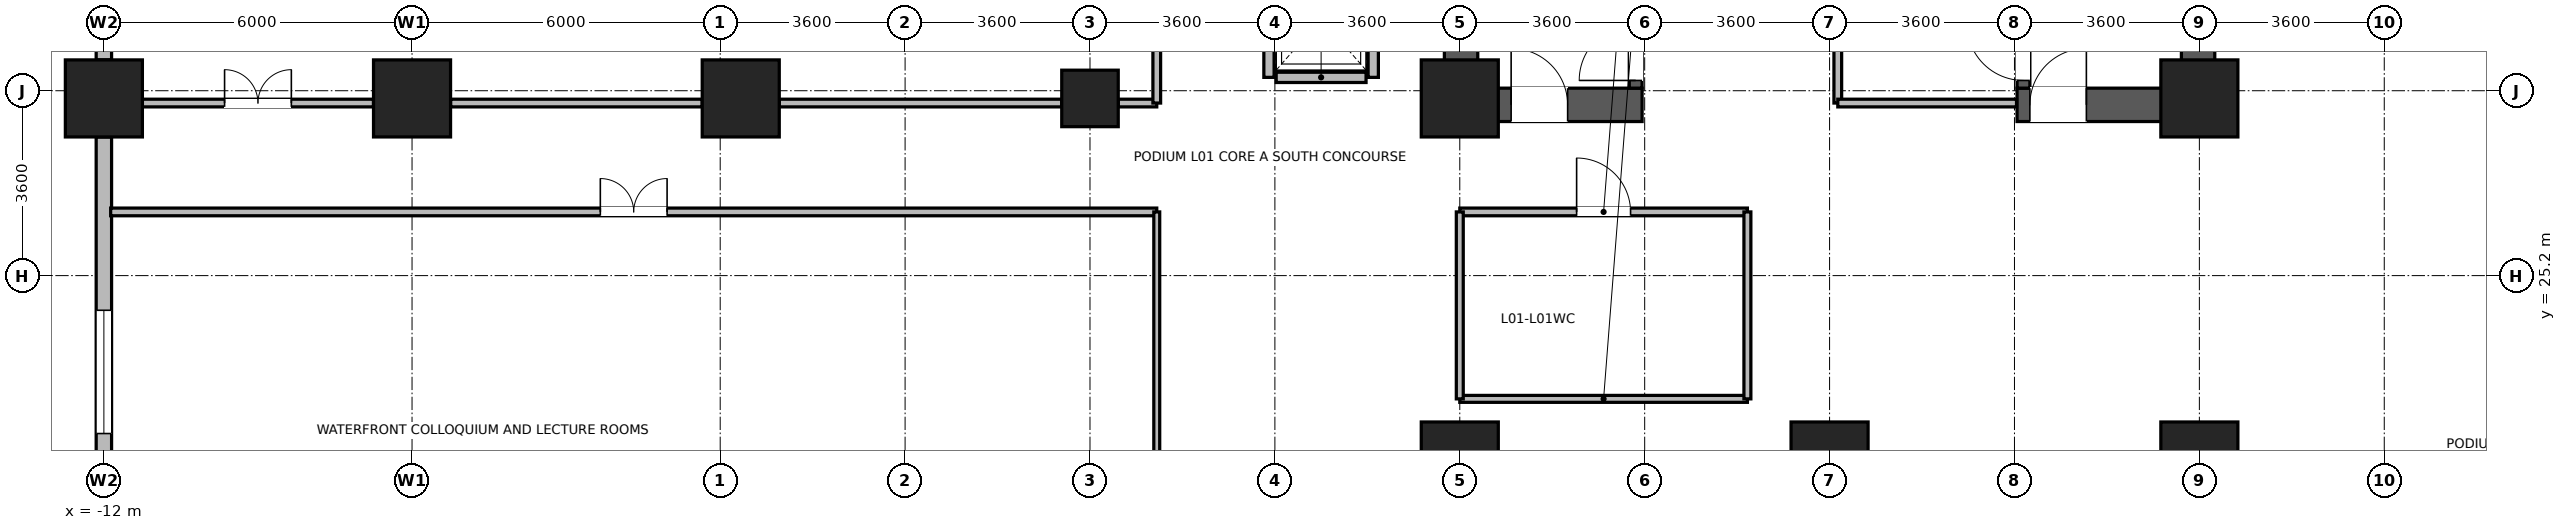
"""IFC4 building model, lengths in metres.
Left out: names, types, materials, properties, quantities, classifications, styles, units other than length and angle.
Written with IfcOpenShell. Run it as: python <this file> out.ifc"""

import sys

from ifc_helpers import new_model, si_unit, direction, frame, frame_2d, origin, origin_2d, place, context, subcontext, project, spatial, rectangle, circle, extrude, source, transform, mapped, element, fill, save


model = new_model("IFC4")
c1 = context("Model", 3, precision=1e-05, world=origin(), true_north=direction((0.0, 1.0)))
c2 = subcontext(c1, "Body", "Model", "MODEL_VIEW")
j1 = project(units=[si_unit("LENGTHUNIT", "METRE"), si_unit("PLANEANGLEUNIT", "RADIAN")], contexts=[c1])
p1 = place(None, origin())
s1 = spatial("IfcSite", under=j1, at=p1, CompositionType="ELEMENT")
p2 = place(p1, origin())
s2 = spatial("IfcBuilding", under=s1, at=p2, CompositionType="ELEMENT")
p3 = place(p2, frame((0.0, 0.0, 5.4)))
s3 = spatial("IfcBuildingStorey", under=s2, at=p3, CompositionType="ELEMENT", Elevation=5.4)
for number, where, z_axis, x_axis in (
    (1, (14.425, 28.2, 0.0), (0.0, 0.0, 1.0), (0.0, 1.0, 0.0)),
    (2, (28.775, 28.2, 0.0), (0.0, 0.0, 1.0), (0.0, 1.0, 0.0)),
):
    element("IfcWall", number, at=place(p3, frame(where, z_axis=z_axis, x_axis=x_axis)), inside=s3, PredefinedType="SHEAR", context=c2, shape_type="SweptSolid", body=[
        extrude(rectangle(XDim=8.3, YDim=0.65, at=frame_2d((4.15, 0.0))), origin(), (0.0, 0.0, 1.0), 4.52),
    ])
p4 = place(p3, frame((14.75, 28.525, 0.0), z_axis=(0.0, 0.0, 1.0), x_axis=(1.0, 0.0, 0.0)))
e3 = element("IfcWall", 3, at=p4, inside=s3, PredefinedType="SHEAR", context=c2, shape_type="SweptSolid", body=[
    extrude(rectangle(XDim=3.2, YDim=0.65, at=frame_2d((1.6, 0.0))), origin(), (0.0, 0.0, 1.0), 4.52),
])
p5 = place(p4, frame((0.65, 0.0, 0.0)))
e4 = element("IfcOpeningElement", 4, at=p5, cuts=e3, PredefinedType="OPENING", context=c2, shape_type="SweptSolid", body=[
    extrude(rectangle(XDim=1.1, YDim=2.08, at=frame_2d((0.55, 1.04))), frame((0.0, 0.335, 0.0), z_axis=(0.0, -1.0, 0.0), x_axis=(1.0, 0.0, 0.0)), (0.0, 0.0, 1.0), 0.67),
])
p6 = place(p3, frame((25.25, 28.525, 0.0), z_axis=(0.0, 0.0, 1.0), x_axis=(1.0, 0.0, 0.0)))
e5 = element("IfcWall", 5, at=p6, inside=s3, PredefinedType="SHEAR", context=c2, shape_type="SweptSolid", body=[
    extrude(rectangle(XDim=3.2, YDim=0.65, at=frame_2d((1.6, 0.0))), origin(), (0.0, 0.0, 1.0), 4.52),
])
p7 = place(p6, frame((0.25, 0.0, 0.0)))
e6 = element("IfcOpeningElement", 6, at=p7, cuts=e5, PredefinedType="OPENING", context=c2, shape_type="SweptSolid", body=[
    extrude(rectangle(XDim=1.1, YDim=2.08, at=frame_2d((0.55, 1.04))), frame((0.0, 0.335, 0.0), z_axis=(0.0, -1.0, 0.0), x_axis=(1.0, 0.0, 0.0)), (0.0, 0.0, 1.0), 0.67),
])
p8 = place(p3, frame((17.825, 28.85, 0.0), z_axis=(0.0, 0.0, 1.0), x_axis=(0.0, 1.0, 0.0)))
e7 = element("IfcWall", 7, at=p8, inside=s3, PredefinedType="SHEAR", context=c2, shape_type="SweptSolid", body=[
    extrude(rectangle(XDim=7.0, YDim=0.25, at=frame_2d((3.5, 0.0))), origin(), (0.0, 0.0, 1.0), 4.52),
])
p9 = place(p8, frame((0.15, 0.0, 0.0)))
e8 = element("IfcOpeningElement", 8, at=p9, cuts=e7, PredefinedType="OPENING", context=c2, shape_type="SweptSolid", body=[
    extrude(rectangle(XDim=1.1, YDim=2.08, at=frame_2d((0.55, 1.04))), frame((0.0, 0.135, 0.0), z_axis=(0.0, -1.0, 0.0), x_axis=(1.0, 0.0, 0.0)), (0.0, 0.0, 1.0), 0.27),
])
p10 = place(p3, frame((25.375, 28.85, 0.0), z_axis=(0.0, 0.0, 1.0), x_axis=(0.0, 1.0, 0.0)))
e9 = element("IfcWall", 9, at=p10, inside=s3, PredefinedType="SHEAR", context=c2, shape_type="SweptSolid", body=[
    extrude(rectangle(XDim=7.0, YDim=0.25, at=frame_2d((3.5, 0.0))), origin(), (0.0, 0.0, 1.0), 4.52),
])
p11 = place(p10, frame((0.15, 0.0, 0.0)))
e10 = element("IfcOpeningElement", 10, at=p11, cuts=e9, PredefinedType="OPENING", context=c2, shape_type="SweptSolid", body=[
    extrude(rectangle(XDim=1.1, YDim=2.08, at=frame_2d((0.55, 1.04))), frame((0.0, 0.135, 0.0), z_axis=(0.0, -1.0, 0.0), x_axis=(1.0, 0.0, 0.0)), (0.0, 0.0, 1.0), 0.27),
])
m1 = source(origin(), c2, "Body", "SweptSolid", [
    extrude(circle(Radius=0.55, at=origin_2d()), origin(), (0.0, 0.0, 1.0), 4.8),
])
p12 = place(p3, frame((7.2, 28.65, 0.0), z_axis=(0.0, 0.0, 1.0), x_axis=(1.0, 0.0, 0.0)))
e11 = element("IfcColumn", 11, at=p12, inside=s3, PredefinedType="COLUMN", context=c2, shape_type="MappedRepresentation", body=[
    mapped(m1, transform((0.0, 0.0, 0.0), x_axis=(1.0, 0.0, 0.0), y_axis=(0.0, 1.0, 0.0), z_axis=(0.0, 0.0, 1.0), scale=1.0)),
])
m2 = source(origin(), c2, "Body", "SweptSolid", [
    extrude(rectangle(XDim=1.5, YDim=1.5, at=origin_2d()), origin(), (0.0, 0.0, 1.0), 4.8),
])
for number, where, z_axis, x_axis in (
    (12, (14.4, 21.6, 0.0), (0.0, 0.0, 1.0), (1.0, 0.0, 0.0)),
    (13, (14.4, 28.65, 0.0), (0.0, 0.0, 1.0), (1.0, 0.0, 0.0)),
    (14, (21.6, 21.6, 0.0), (0.0, 0.0, 1.0), (1.0, 0.0, 0.0)),
    (15, (28.8, 21.6, 0.0), (0.0, 0.0, 1.0), (1.0, 0.0, 0.0)),
    (16, (28.8, 28.65, 0.0), (0.0, 0.0, 1.0), (1.0, 0.0, 0.0)),
    (17, (0.4, 28.65, 0.0), (0.0, 0.0, 1.0), (1.0, 0.0, 0.0)),
    (18, (-12.0, 28.65, 0.0), (0.0, 0.0, 1.0), (1.0, 0.0, 0.0)),
    (19, (-6.0, 28.65, 0.0), (0.0, 0.0, 1.0), (1.0, 0.0, 0.0)),
):
    element("IfcColumn", number, at=place(p3, frame(where, z_axis=z_axis, x_axis=x_axis)), inside=s3, PredefinedType="COLUMN", context=c2, shape_type="MappedRepresentation", body=[
        mapped(m2, transform((0.0, 0.0, 0.0), x_axis=(1.0, 0.0, 0.0), y_axis=(0.0, 1.0, 0.0), z_axis=(0.0, 0.0, 1.0), scale=1.0)),
    ])
p13 = place(p3, frame((-12.0, 29.401, 0.0), z_axis=(0.0, 0.0, 1.0), x_axis=(0.0, 1.0, 0.0)))
e20 = element("IfcWall", 20, at=p13, inside=s3, PredefinedType="STANDARD", context=c2, shape_type="SweptSolid", body=[
    extrude(rectangle(XDim=5.998, YDim=0.3, at=frame_2d((2.999, 0.0))), origin(), (0.0, 0.0, 1.0), 3.9),
])
p14 = place(p13, frame((2.524, 0.0, 0.9)))
e21 = element("IfcOpeningElement", 21, at=p14, cuts=e20, PredefinedType="OPENING", context=c2, shape_type="SweptSolid", body=[
    extrude(rectangle(XDim=0.95, YDim=1.75, at=frame_2d((0.475, 0.875))), frame((0.0, 0.16, 0.0), z_axis=(0.0, -1.0, 0.0), x_axis=(1.0, 0.0, 0.0)), (0.0, 0.0, 1.0), 0.32),
])
p15 = place(p13, frame((1.037, 0.0, 0.9)))
e22 = element("IfcOpeningElement", 22, at=p15, cuts=e20, PredefinedType="OPENING", context=c2, shape_type="SweptSolid", body=[
    extrude(rectangle(XDim=0.95, YDim=1.75, at=frame_2d((0.475, 0.875))), frame((0.0, 0.16, 0.0), z_axis=(0.0, -1.0, 0.0), x_axis=(1.0, 0.0, 0.0)), (0.0, 0.0, 1.0), 0.32),
])
p16 = place(p3, frame((-12.0, 18.751, 0.0), z_axis=(0.0, 0.0, 1.0), x_axis=(0.0, 1.0, 0.0)))
e23 = element("IfcWall", 23, at=p16, inside=s3, PredefinedType="STANDARD", context=c2, shape_type="SweptSolid", body=[
    extrude(rectangle(XDim=9.148, YDim=0.3, at=frame_2d((4.574, 0.0))), origin(), (0.0, 0.0, 1.0), 3.9),
])
p17 = place(p16, frame((0.325, 0.0, 0.9)))
e24 = element("IfcOpeningElement", 24, at=p17, cuts=e23, PredefinedType="OPENING", context=c2, shape_type="SweptSolid", body=[
    extrude(rectangle(XDim=2.4, YDim=2.5, at=frame_2d((1.2, 1.25))), frame((0.0, 0.16, 0.0), z_axis=(0.0, -1.0, 0.0), x_axis=(1.0, 0.0, 0.0)), (0.0, 0.0, 1.0), 0.32),
])
p18 = place(p16, frame((3.374, 0.0, 0.9)))
e25 = element("IfcOpeningElement", 25, at=p18, cuts=e23, PredefinedType="OPENING", context=c2, shape_type="SweptSolid", body=[
    extrude(rectangle(XDim=2.4, YDim=2.5, at=frame_2d((1.2, 1.25))), frame((0.0, 0.16, 0.0), z_axis=(0.0, -1.0, 0.0), x_axis=(1.0, 0.0, 0.0)), (0.0, 0.0, 1.0), 0.32),
])
p19 = place(p3, frame((10.825, 29.06, 0.0), z_axis=(0.0, 0.0, 1.0), x_axis=(1.0, 0.0, 0.0)))
e26 = element("IfcWall", 26, at=p19, inside=s3, PredefinedType="PARTITIONING", context=c2, shape_type="SweptSolid", body=[
    extrude(rectangle(XDim=1.75, YDim=0.2, at=frame_2d((0.875, 0.0))), origin(), (0.0, 0.0, 1.0), 4.5),
])
for number, where, z_axis, x_axis in (
    (27, (10.685, 29.06, 0.0), (0.0, 0.0, 1.0), (0.0, 1.0, 0.0)),
    (28, (12.715, 29.06, 0.0), (0.0, 0.0, 1.0), (0.0, 1.0, 0.0)),
):
    element("IfcWall", number, at=place(p3, frame(where, z_axis=z_axis, x_axis=x_axis)), inside=s3, PredefinedType="PARTITIONING", context=c2, shape_type="SweptSolid", body=[
        extrude(rectangle(XDim=2.28, YDim=0.2, at=frame_2d((1.14, 0.0))), origin(), (0.0, 0.0, 1.0), 4.5),
    ])
p20 = place(p3, frame((-11.868, 26.44, 0.0), z_axis=(0.0, 0.0, 1.0), x_axis=(1.0, 0.0, 0.0)))
e29 = element("IfcWall", 29, at=p20, inside=s3, PredefinedType="PARTITIONING", context=c2, shape_type="SweptSolid", body=[
    extrude(rectangle(XDim=20.368, YDim=0.15, at=frame_2d((10.184, 0.0))), origin(), (0.0, 0.0, 1.0), 4.5),
])
p21 = place(p20, frame((9.534, 0.0, 0.0)))
e30 = element("IfcOpeningElement", 30, at=p21, cuts=e29, PredefinedType="OPENING", context=c2, shape_type="SweptSolid", body=[
    extrude(rectangle(XDim=1.3, YDim=2.12, at=frame_2d((0.65, 1.06))), frame((0.0, 0.085, 0.0), z_axis=(0.0, -1.0, 0.0), x_axis=(1.0, 0.0, 0.0)), (0.0, 0.0, 1.0), 0.17),
])
p22 = place(p3, frame((-11.25, 28.56, 0.0), z_axis=(0.0, 0.0, 1.0), x_axis=(1.0, 0.0, 0.0)))
e31 = element("IfcWall", 31, at=p22, inside=s3, PredefinedType="PARTITIONING", context=c2, shape_type="SweptSolid", body=[
    extrude(rectangle(XDim=4.5, YDim=0.15, at=frame_2d((2.25, 0.0))), origin(), (0.0, 0.0, 1.0), 3.8),
])
p23 = place(p22, frame((1.6, 0.0, 0.0)))
e32 = element("IfcOpeningElement", 32, at=p23, cuts=e31, PredefinedType="OPENING", context=c2, shape_type="SweptSolid", body=[
    extrude(rectangle(XDim=1.3, YDim=2.12, at=frame_2d((0.65, 1.06))), frame((0.0, 0.085, 0.0), z_axis=(0.0, -1.0, 0.0), x_axis=(1.0, 0.0, 0.0)), (0.0, 0.0, 1.0), 0.17),
])
p24 = place(p3, frame((-5.25, 28.56, 0.0), z_axis=(0.0, 0.0, 1.0), x_axis=(1.0, 0.0, 0.0)))
e33 = element("IfcWall", 33, at=p24, inside=s3, PredefinedType="PARTITIONING", context=c2, shape_type="SweptSolid", body=[
    extrude(rectangle(XDim=4.9, YDim=0.15, at=frame_2d((2.45, 0.0))), origin(), (0.0, 0.0, 1.0), 3.8),
])
p25 = place(p3, frame((1.15, 28.56, 0.0), z_axis=(0.0, 0.0, 1.0), x_axis=(1.0, 0.0, 0.0)))
e34 = element("IfcWall", 34, at=p25, inside=s3, PredefinedType="PARTITIONING", context=c2, shape_type="SweptSolid", body=[
    extrude(rectangle(XDim=5.5, YDim=0.15, at=frame_2d((2.75, 0.0))), origin(), (0.0, 0.0, 1.0), 3.8),
])
p26 = place(p3, frame((7.75, 28.56, 0.0), z_axis=(0.0, 0.0, 1.0), x_axis=(1.0, 0.0, 0.0)))
e35 = element("IfcWall", 35, at=p26, inside=s3, PredefinedType="PARTITIONING", context=c2, shape_type="SweptSolid", body=[
    extrude(rectangle(XDim=0.75, YDim=0.15, at=frame_2d((0.375, 0.0))), origin(), (0.0, 0.0, 1.0), 3.8),
])
p27 = place(p3, frame((8.5, 28.56, 0.0), z_axis=(0.0, 0.0, 1.0), x_axis=(0.0, 1.0, 0.0)))
e36 = element("IfcWall", 36, at=p27, inside=s3, PredefinedType="PARTITIONING", context=c2, shape_type="SweptSolid", body=[
    extrude(rectangle(XDim=7.68, YDim=0.15, at=frame_2d((3.84, 0.0))), origin(), (0.0, 0.0, 1.0), 4.5),
])
p28 = place(p3, frame((14.4, 26.44, 0.0), z_axis=(0.0, 0.0, 1.0), x_axis=(1.0, 0.0, 0.0)))
e37 = element("IfcWall", 37, at=p28, inside=s3, PredefinedType="PARTITIONING", context=c2, shape_type="SweptSolid", body=[
    extrude(rectangle(XDim=5.6, YDim=0.15, at=frame_2d((2.8, 0.0))), origin(), (0.0, 0.0, 1.0), 4.5),
])
p29 = place(p28, frame((2.275, 0.0, 0.0)))
e38 = element("IfcOpeningElement", 38, at=p29, cuts=e37, PredefinedType="OPENING", context=c2, shape_type="SweptSolid", body=[
    extrude(rectangle(XDim=1.05, YDim=2.12, at=frame_2d((0.525, 1.06))), frame((0.0, 0.085, 0.0), z_axis=(0.0, -1.0, 0.0), x_axis=(1.0, 0.0, 0.0)), (0.0, 0.0, 1.0), 0.17),
])
p30 = place(p3, frame((8.5, 18.132, 0.0), z_axis=(0.0, 0.0, 1.0), x_axis=(0.0, 1.0, 0.0)))
e39 = element("IfcWall", 39, at=p30, inside=s3, PredefinedType="PARTITIONING", context=c2, shape_type="SweptSolid", body=[
    extrude(rectangle(XDim=8.308, YDim=0.115, at=frame_2d((4.154, 0.0))), origin(), (0.0, 0.0, 1.0), 4.5),
])
p31 = place(p3, frame((14.4, 22.8, 0.0), z_axis=(0.0, 0.0, 1.0), x_axis=(1.0, 0.0, 0.0)))
e40 = element("IfcWall", 40, at=p31, inside=s3, PredefinedType="PARTITIONING", context=c2, shape_type="SweptSolid", body=[
    extrude(rectangle(XDim=5.6, YDim=0.135, at=frame_2d((2.8, 0.0))), origin(), (0.0, 0.0, 1.0), 4.5),
])
p32 = place(p3, frame((21.76, 28.56, 0.0), z_axis=(0.0, 0.0, 1.0), x_axis=(0.0, 1.0, 0.0)))
e41 = element("IfcWall", 41, at=p32, inside=s3, PredefinedType="PARTITIONING", context=c2, shape_type="SweptSolid", body=[
    extrude(rectangle(XDim=4.6, YDim=0.15, at=frame_2d((2.3, 0.0))), origin(), (0.0, 0.0, 1.0), 4.5),
])
p33 = place(p32, frame((1.55, 0.0, 0.0)))
e42 = element("IfcOpeningElement", 42, at=p33, cuts=e41, PredefinedType="OPENING", context=c2, shape_type="SweptSolid", body=[
    extrude(rectangle(XDim=1.5, YDim=2.1, at=frame_2d((0.75, 1.05))), frame((0.0, 0.085, 0.0), z_axis=(0.0, -1.0, 0.0), x_axis=(1.0, 0.0, 0.0)), (0.0, 0.0, 1.0), 0.17),
])
p34 = place(p3, frame((14.4, 22.8, 0.0), z_axis=(0.0, 0.0, 1.0), x_axis=(0.0, 1.0, 0.0)))
e43 = element("IfcWall", 43, at=p34, inside=s3, PredefinedType="PARTITIONING", context=c2, shape_type="SweptSolid", body=[
    extrude(rectangle(XDim=3.64, YDim=0.135, at=frame_2d((1.82, 0.0))), origin(), (0.0, 0.0, 1.0), 3.9),
])
p35 = place(p3, frame((20.0, 22.8, 0.0), z_axis=(0.0, 0.0, 1.0), x_axis=(0.0, 1.0, 0.0)))
e44 = element("IfcWall", 44, at=p35, inside=s3, PredefinedType="PARTITIONING", context=c2, shape_type="SweptSolid", body=[
    extrude(rectangle(XDim=3.64, YDim=0.135, at=frame_2d((1.82, 0.0))), origin(), (0.0, 0.0, 1.0), 4.5),
])
p36 = place(p3, frame((21.76, 28.56, 0.0), z_axis=(0.0, 0.0, 1.0), x_axis=(1.0, 0.0, 0.0)))
e45 = element("IfcWall", 45, at=p36, inside=s3, PredefinedType="PARTITIONING", context=c2, shape_type="SweptSolid", body=[
    extrude(rectangle(XDim=3.48, YDim=0.15, at=frame_2d((1.74, 0.0))), origin(), (0.0, 0.0, 1.0), 3.3),
])
p37 = place(p18, origin())
e46 = element("IfcWindow", 46, at=p37, inside=s3, PartitioningType="SINGLE_PANEL", PredefinedType="WINDOW", context=c2, shape_type="SweptSolid", body=[
    extrude(rectangle(XDim=2.4, YDim=2.5, at=frame_2d((1.2, 1.25))), frame((0.0, 0.03, 0.0), z_axis=(0.0, -1.0, 0.0), x_axis=(1.0, 0.0, 0.0)), (0.0, 0.0, 1.0), 0.06),
])
fill(e25, e46)
p38 = place(p9, origin())
e47 = element("IfcDoor", 47, at=p38, inside=s3, OperationType="SINGLE_SWING_LEFT", PredefinedType="DOOR", context=c2, shape_type="SweptSolid", body=[
    extrude(rectangle(XDim=1.1, YDim=2.08, at=frame_2d((0.55, 1.04))), frame((0.0, 0.025, 0.0), z_axis=(0.0, -1.0, 0.0), x_axis=(1.0, 0.0, 0.0)), (0.0, 0.0, 1.0), 0.05),
])
fill(e8, e47)
p39 = place(p5, origin())
e48 = element("IfcDoor", 48, at=p39, inside=s3, OperationType="SINGLE_SWING_LEFT", PredefinedType="DOOR", context=c2, shape_type="SweptSolid", body=[
    extrude(rectangle(XDim=1.1, YDim=2.08, at=frame_2d((0.55, 1.04))), frame((0.0, 0.025, 0.0), z_axis=(0.0, -1.0, 0.0), x_axis=(1.0, 0.0, 0.0)), (0.0, 0.0, 1.0), 0.05),
])
fill(e4, e48)
p40 = place(p11, origin())
e49 = element("IfcDoor", 49, at=p40, inside=s3, OperationType="SINGLE_SWING_RIGHT", PredefinedType="DOOR", context=c2, shape_type="SweptSolid", body=[
    extrude(rectangle(XDim=1.1, YDim=2.08, at=frame_2d((0.55, 1.04))), frame((0.0, 0.025, 0.0), z_axis=(0.0, -1.0, 0.0), x_axis=(1.0, 0.0, 0.0)), (0.0, 0.0, 1.0), 0.05),
])
fill(e10, e49)
p41 = place(p7, origin())
e50 = element("IfcDoor", 50, at=p41, inside=s3, OperationType="SINGLE_SWING_RIGHT", PredefinedType="DOOR", context=c2, shape_type="SweptSolid", body=[
    extrude(rectangle(XDim=1.1, YDim=2.08, at=frame_2d((0.55, 1.04))), frame((0.0, 0.025, 0.0), z_axis=(0.0, -1.0, 0.0), x_axis=(1.0, 0.0, 0.0)), (0.0, 0.0, 1.0), 0.05),
])
fill(e6, e50)
p42 = place(p21, origin())
e51 = element("IfcDoor", 51, at=p42, inside=s3, OperationType="DOUBLE_DOOR_SINGLE_SWING", PredefinedType="DOOR", context=c2, shape_type="SweptSolid", body=[
    extrude(rectangle(XDim=1.3, YDim=2.12, at=frame_2d((0.65, 1.06))), frame((0.0, 0.025, 0.0), z_axis=(0.0, -1.0, 0.0), x_axis=(1.0, 0.0, 0.0)), (0.0, 0.0, 1.0), 0.05),
])
fill(e30, e51)
p43 = place(p23, origin())
e52 = element("IfcDoor", 52, at=p43, inside=s3, OperationType="DOUBLE_DOOR_SINGLE_SWING", PredefinedType="DOOR", context=c2, shape_type="SweptSolid", body=[
    extrude(rectangle(XDim=1.3, YDim=2.12, at=frame_2d((0.65, 1.06))), frame((0.0, 0.025, 0.0), z_axis=(0.0, -1.0, 0.0), x_axis=(1.0, 0.0, 0.0)), (0.0, 0.0, 1.0), 0.05),
])
fill(e32, e52)
p44 = place(p29, origin())
e53 = element("IfcDoor", 53, at=p44, inside=s3, OperationType="SINGLE_SWING_LEFT", PredefinedType="DOOR", context=c2, shape_type="SweptSolid", body=[
    extrude(rectangle(XDim=1.05, YDim=2.12, at=frame_2d((0.525, 1.06))), frame((0.0, 0.025, 0.0), z_axis=(0.0, -1.0, 0.0), x_axis=(1.0, 0.0, 0.0)), (0.0, 0.0, 1.0), 0.05),
])
fill(e38, e53)
save(model, sys.argv[1])
